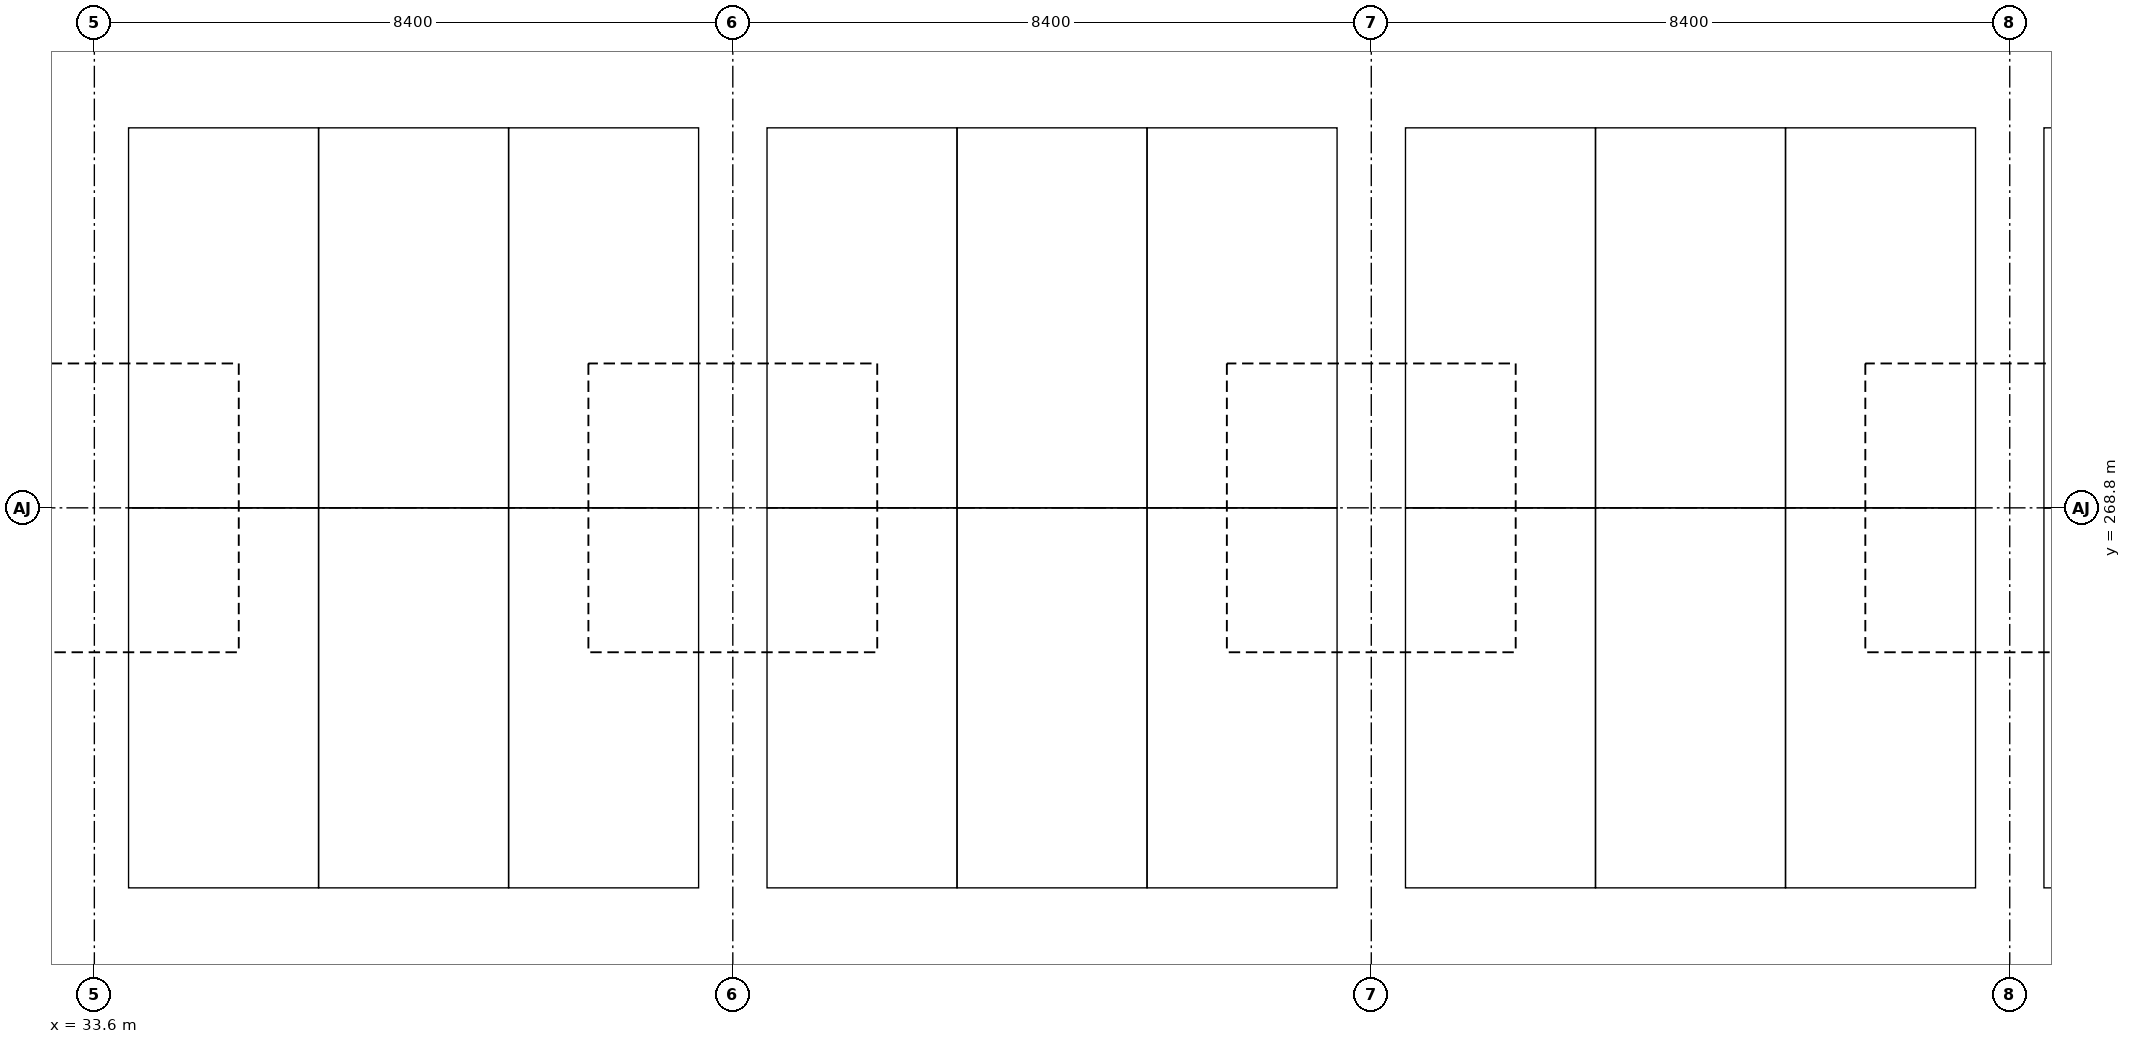
"""IFC4 building model, lengths in metres.
Left out: names, types, materials, properties, quantities, classifications, styles, units other than length and angle.
Written with IfcOpenShell. Run it as: python <this file> out.ifc"""

import sys

from ifc_helpers import new_model, si_unit, direction, frame, origin, origin_2d, place, context, subcontext, project, spatial, rectangle, extrude, element, save


model = new_model("IFC4")
c1 = context("Model", 3, precision=1e-05, world=origin(), true_north=direction((0.0, 1.0)))
c2 = subcontext(c1, "Body", "Model", "MODEL_VIEW")
j1 = project(units=[si_unit("LENGTHUNIT", "METRE"), si_unit("PLANEANGLEUNIT", "RADIAN")], contexts=[c1])
p1 = place(None, origin())
s1 = spatial("IfcSite", under=j1, at=p1, CompositionType="ELEMENT")
p2 = place(p1, origin())
s2 = spatial("IfcBuilding", under=s1, at=p2, CompositionType="ELEMENT")
p3 = place(p2, frame((0.0, 0.0, -3.0)))
s3 = spatial("IfcBuildingStorey", under=s2, at=p3, CompositionType="ELEMENT", Elevation=-3.0)
for number, where, z_axis, x_axis in (
    (1, (33.6, 268.8, 0.0), (0.0, 0.0, 1.0), (1.0, 0.0, 0.0)),
    (2, (42.0, 268.8, 0.0), (0.0, 0.0, 1.0), (1.0, 0.0, 0.0)),
    (3, (50.4, 268.8, 0.0), (0.0, 0.0, 1.0), (1.0, 0.0, 0.0)),
    (4, (58.8, 268.8, 0.0), (0.0, 0.0, 1.0), (1.0, 0.0, 0.0)),
):
    element("IfcColumn", number, at=place(p3, frame(where, z_axis=z_axis, x_axis=x_axis)), inside=s3, PredefinedType="COLUMN", context=c2, shape_type="SweptSolid", body=[
        extrude(rectangle(XDim=0.8, YDim=0.8, at=origin_2d()), origin(), (0.0, 0.0, 1.0), 2.4),
    ])
save(model, sys.argv[1])
